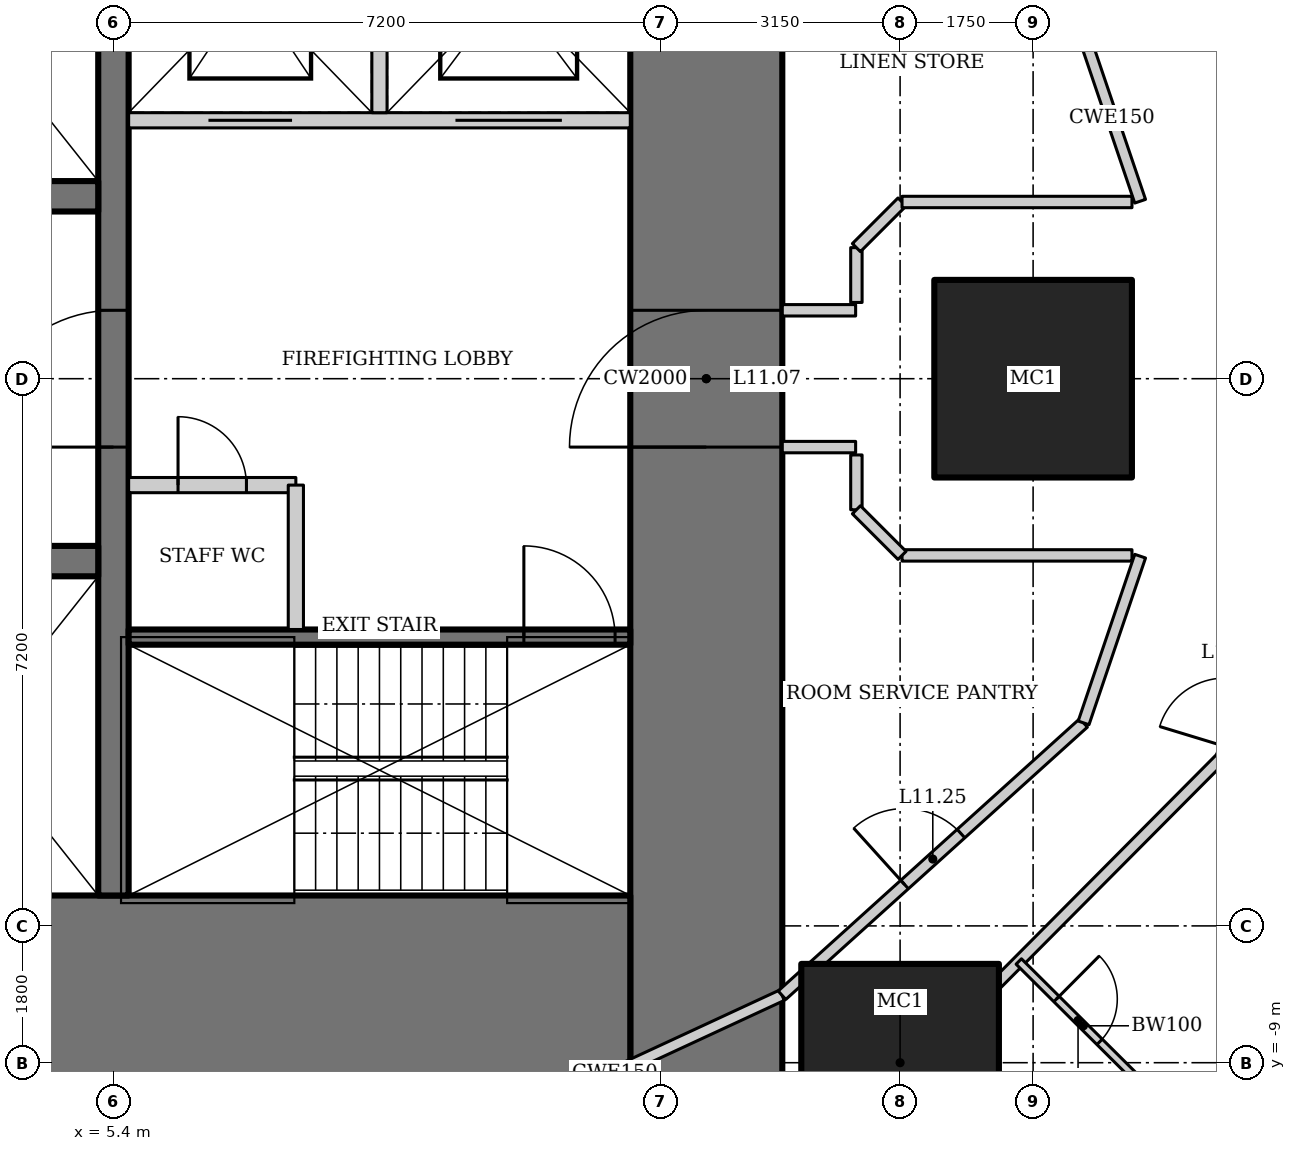
"""IFC4 building model, lengths in metres.
Left out: names, types, materials, properties, quantities, classifications, styles, units other than length and angle.
Written with IfcOpenShell. Run it as: python <this file> out.ifc"""

import sys

from ifc_helpers import new_model, si_unit, direction, frame, frame_2d, origin, origin_2d, place, context, subcontext, project, spatial, rectangle, hollow_rectangle, extrude, element, fill, save


model = new_model("IFC4")
c1 = context("Model", 3, precision=1e-05, world=origin(), true_north=direction((0.0, 1.0)))
c2 = subcontext(c1, "Body", "Model", "MODEL_VIEW")
j1 = project(units=[si_unit("LENGTHUNIT", "METRE"), si_unit("PLANEANGLEUNIT", "RADIAN")], contexts=[c1])
p1 = place(None, origin())
s1 = spatial("IfcSite", under=j1, at=p1, CompositionType="ELEMENT")
p2 = place(p1, origin())
s2 = spatial("IfcBuilding", under=s1, at=p2, CompositionType="ELEMENT")
p3 = place(p2, frame((0.0, 0.0, 55.0)))
s3 = spatial("IfcBuildingStorey", under=s2, at=p3, CompositionType="ELEMENT", Elevation=55.0)
for number, where, z_axis, x_axis in (
    (1, (17.5, 0.0, 0.0), (0.0, 0.0, 1.0), (1.0, 0.0, 0.0)),
    (2, (15.75, -9.0, 0.0), (0.0, 0.0, 1.0), (1.0, 0.0, 0.0)),
):
    element("IfcColumn", number, at=place(p3, frame(where, z_axis=z_axis, x_axis=x_axis)), inside=s3, PredefinedType="COLUMN", context=c2, shape_type="SweptSolid", body=[
        extrude(hollow_rectangle(XDim=2.6, YDim=2.6, WallThickness=0.13, at=origin_2d()), origin(), (0.0, 0.0, 1.0), 3.6),
    ])
p4 = place(p3, frame((13.2, -13.0, 0.0), z_axis=(0.0, 0.0, 1.0), x_axis=(0.0, 1.0, 0.0)))
e3 = element("IfcWall", 3, at=p4, inside=s3, PredefinedType="SHEAR", context=c2, shape_type="SweptSolid", body=[
    extrude(rectangle(XDim=26.0, YDim=2.0, at=frame_2d((13.0, 0.0))), origin(), (0.0, 0.0, 1.0), 3.6),
])
p5 = place(p4, frame((12.1, 0.0, 0.0)))
e4 = element("IfcOpeningElement", 4, at=p5, cuts=e3, PredefinedType="OPENING", context=c2, shape_type="SweptSolid", body=[
    extrude(rectangle(XDim=1.8, YDim=2.1, at=frame_2d((0.9, 1.05))), frame((0.0, 1.01, 0.0), z_axis=(0.0, -1.0, 0.0), x_axis=(1.0, 0.0, 0.0)), (0.0, 0.0, 1.0), 2.02),
])
p6 = place(p3, frame((-12.2, -8.0, 0.0), z_axis=(0.0, 0.0, 1.0), x_axis=(1.0, 0.0, 0.0)))
e5 = element("IfcWall", 5, at=p6, inside=s3, PredefinedType="SHEAR", context=c2, shape_type="SweptSolid", body=[
    extrude(rectangle(XDim=24.4, YDim=2.4, at=frame_2d((12.2, 0.0))), origin(), (0.0, 0.0, 1.0), 3.6),
])
p7 = place(p3, frame((5.4, -6.8, 0.0), z_axis=(0.0, 0.0, 1.0), x_axis=(0.0, 1.0, 0.0)))
e6 = element("IfcWall", 6, at=p7, inside=s3, PredefinedType="SHEAR", context=c2, shape_type="SweptSolid", body=[
    extrude(rectangle(XDim=13.6, YDim=0.4, at=frame_2d((6.8, 0.0))), origin(), (0.0, 0.0, 1.0), 3.6),
])
p8 = place(p7, frame((5.9, 0.0, 0.0)))
e7 = element("IfcOpeningElement", 7, at=p8, cuts=e6, PredefinedType="OPENING", context=c2, shape_type="SweptSolid", body=[
    extrude(rectangle(XDim=1.8, YDim=2.1, at=frame_2d((0.9, 1.05))), frame((0.0, 0.21, 0.0), z_axis=(0.0, -1.0, 0.0), x_axis=(1.0, 0.0, 0.0)), (0.0, 0.0, 1.0), 0.42),
])
p9 = place(p3, frame((-5.2, -2.4, 0.0), z_axis=(0.0, 0.0, 1.0), x_axis=(1.0, 0.0, 0.0)))
e8 = element("IfcWall", 8, at=p9, inside=s3, PredefinedType="SHEAR", context=c2, shape_type="SweptSolid", body=[
    extrude(rectangle(XDim=10.4, YDim=0.4, at=frame_2d((5.2, 0.0))), origin(), (0.0, 0.0, 1.0), 3.6),
])
p10 = place(p9, frame((0.55, 0.0, 0.0)))
e9 = element("IfcOpeningElement", 9, at=p10, cuts=e8, PredefinedType="OPENING", context=c2, shape_type="SweptSolid", body=[
    extrude(rectangle(XDim=1.1, YDim=2.2, at=frame_2d((0.55, 1.1))), frame((0.0, 0.21, 0.0), z_axis=(0.0, -1.0, 0.0), x_axis=(1.0, 0.0, 0.0)), (0.0, 0.0, 1.0), 0.42),
])
p11 = place(p9, frame((4.083, 0.0, 0.0)))
e10 = element("IfcOpeningElement", 10, at=p11, cuts=e8, PredefinedType="OPENING", context=c2, shape_type="SweptSolid", body=[
    extrude(rectangle(XDim=1.1, YDim=2.2, at=frame_2d((0.55, 1.1))), frame((0.0, 0.21, 0.0), z_axis=(0.0, -1.0, 0.0), x_axis=(1.0, 0.0, 0.0)), (0.0, 0.0, 1.0), 0.42),
])
p12 = place(p9, frame((7.617, 0.0, 0.0)))
e11 = element("IfcOpeningElement", 11, at=p12, cuts=e8, PredefinedType="OPENING", context=c2, shape_type="SweptSolid", body=[
    extrude(rectangle(XDim=1.1, YDim=2.2, at=frame_2d((0.55, 1.1))), frame((0.0, 0.21, 0.0), z_axis=(0.0, -1.0, 0.0), x_axis=(1.0, 0.0, 0.0)), (0.0, 0.0, 1.0), 0.42),
])
p13 = place(p3, frame((5.2, 2.4, 0.0), z_axis=(0.0, 0.0, 1.0), x_axis=(-1.0, 0.0, 0.0)))
e12 = element("IfcWall", 12, at=p13, inside=s3, PredefinedType="SHEAR", context=c2, shape_type="SweptSolid", body=[
    extrude(rectangle(XDim=10.4, YDim=0.4, at=frame_2d((5.2, 0.0))), origin(), (0.0, 0.0, 1.0), 3.6),
])
p14 = place(p3, frame((5.6, -3.4, 0.0), z_axis=(0.0, 0.0, 1.0), x_axis=(1.0, 0.0, 0.0)))
e13 = element("IfcWall", 13, at=p14, inside=s3, PredefinedType="SHEAR", context=c2, shape_type="SweptSolid", body=[
    extrude(rectangle(XDim=6.6, YDim=0.2, at=frame_2d((3.3, 0.0))), origin(), (0.0, 0.0, 1.0), 3.6),
])
p15 = place(p14, frame((5.2, 0.0, 0.0)))
e14 = element("IfcOpeningElement", 14, at=p15, cuts=e13, PredefinedType="OPENING", context=c2, shape_type="SweptSolid", body=[
    extrude(rectangle(XDim=1.2, YDim=2.1, at=frame_2d((0.6, 1.05))), frame((0.0, 0.11, 0.0), z_axis=(0.0, -1.0, 0.0), x_axis=(1.0, 0.0, 0.0)), (0.0, 0.0, 1.0), 0.22),
])
p16 = place(p3, frame((12.2, 3.4, 0.0), z_axis=(0.0, 0.0, 1.0), x_axis=(-1.0, 0.0, 0.0)))
e15 = element("IfcWall", 15, at=p16, inside=s3, PredefinedType="SOLIDWALL", context=c2, shape_type="SweptSolid", body=[
    extrude(rectangle(XDim=6.6, YDim=0.2, at=frame_2d((3.3, 0.0))), origin(), (0.0, 0.0, 1.0), 3.6),
])
p17 = place(p16, frame((4.45, 0.0, 0.0)))
e16 = element("IfcOpeningElement", 16, at=p17, cuts=e15, PredefinedType="OPENING", context=c2, shape_type="SweptSolid", body=[
    extrude(rectangle(XDim=1.1, YDim=2.2, at=frame_2d((0.55, 1.1))), frame((0.0, 0.11, 0.0), z_axis=(0.0, -1.0, 0.0), x_axis=(1.0, 0.0, 0.0)), (0.0, 0.0, 1.0), 0.22),
])
p18 = place(p16, frame((0.9, 0.0, 0.0)))
e17 = element("IfcOpeningElement", 17, at=p18, cuts=e15, PredefinedType="OPENING", context=c2, shape_type="SweptSolid", body=[
    extrude(rectangle(XDim=1.4, YDim=2.2, at=frame_2d((0.7, 1.1))), frame((0.0, 0.11, 0.0), z_axis=(0.0, -1.0, 0.0), x_axis=(1.0, 0.0, 0.0)), (0.0, 0.0, 1.0), 0.22),
])
p19 = place(p3, frame((8.9, 3.5, 0.0), z_axis=(0.0, 0.0, 1.0), x_axis=(0.0, 1.0, 0.0)))
e18 = element("IfcWall", 18, at=p19, inside=s3, PredefinedType="SOLIDWALL", context=c2, shape_type="SweptSolid", body=[
    extrude(rectangle(XDim=3.3, YDim=0.2, at=frame_2d((1.65, 0.0))), origin(), (0.0, 0.0, 1.0), 3.6),
])
p20 = place(p3, frame((5.6, -1.4, 0.0), z_axis=(0.0, 0.0, 1.0), x_axis=(1.0, 0.0, 0.0)))
e19 = element("IfcWall", 19, at=p20, inside=s3, PredefinedType="SOLIDWALL", context=c2, shape_type="SweptSolid", body=[
    extrude(rectangle(XDim=2.2, YDim=0.2, at=frame_2d((1.1, 0.0))), origin(), (0.0, 0.0, 1.0), 3.45),
])
p21 = place(p20, frame((0.65, 0.0, 0.0)))
e20 = element("IfcOpeningElement", 20, at=p21, cuts=e19, PredefinedType="OPENING", context=c2, shape_type="SweptSolid", body=[
    extrude(rectangle(XDim=0.9, YDim=2.1, at=frame_2d((0.45, 1.05))), frame((0.0, 0.11, 0.0), z_axis=(0.0, -1.0, 0.0), x_axis=(1.0, 0.0, 0.0)), (0.0, 0.0, 1.0), 0.22),
])
p22 = place(p3, frame((7.8, -1.4, 0.0), z_axis=(0.0, 0.0, 1.0), x_axis=(0.0, -1.0, 0.0)))
e21 = element("IfcWall", 21, at=p22, inside=s3, PredefinedType="SOLIDWALL", context=c2, shape_type="SweptSolid", body=[
    extrude(rectangle(XDim=1.9, YDim=0.2, at=frame_2d((0.95, 0.0))), origin(), (0.0, 0.0, 1.0), 3.45),
])
p23 = place(p3, frame((24.435, -13.909, 0.0), z_axis=(0.0, 0.0, 1.0), x_axis=(-0.870612006791, 0.491970256856, 0.0)))
e22 = element("IfcWall", 22, at=p23, inside=s3, PredefinedType="PARTITIONING", context=c2, shape_type="SweptSolid", body=[
    extrude(rectangle(XDim=9.802, YDim=0.15, at=frame_2d((4.901, 0.0))), origin(), (0.0, 0.0, 1.0), 2.693),
])
p24 = place(p3, frame((21.5, 0.0, 0.0), z_axis=(0.0, 0.0, 1.0), x_axis=(-0.291383581394, 0.95660629754, 0.0)))
e23 = element("IfcWall", 23, at=p24, inside=s3, PredefinedType="PARTITIONING", context=c2, shape_type="SweptSolid", body=[
    extrude(rectangle(XDim=5.208, YDim=0.15, at=frame_2d((2.604, 0.0))), origin(), (0.0, 0.0, 1.0), 3.45),
])
p25 = place(p3, frame((11.147, -11.544, 0.0), z_axis=(0.0, 0.0, 1.0), x_axis=(0.888333171507, 0.459199495209, 0.0)))
e24 = element("IfcWall", 24, at=p25, inside=s3, PredefinedType="PARTITIONING", context=c2, shape_type="SweptSolid", body=[
    extrude(rectangle(XDim=5.351, YDim=0.15, at=frame_2d((2.676, 0.0))), origin(), (0.0, 0.0, 1.0), 3.45),
])
p26 = place(p25, frame((0.15, 0.0, 0.0)))
e25 = element("IfcOpeningElement", 25, at=p26, cuts=e24, PredefinedType="OPENING", context=c2, shape_type="SweptSolid", body=[
    extrude(rectangle(XDim=0.9, YDim=2.1, at=frame_2d((0.45, 1.05))), frame((0.0, 0.085, 0.0), z_axis=(0.0, -1.0, 0.0), x_axis=(1.0, 0.0, 0.0)), (0.0, 0.0, 1.0), 0.17),
])
p27 = place(p3, frame((15.901, -9.086, 0.0), z_axis=(0.0, 0.0, 1.0), x_axis=(0.705121546414, 0.709086457904, 0.0)))
e26 = element("IfcWall", 26, at=p27, inside=s3, PredefinedType="PARTITIONING", context=c2, shape_type="SweptSolid", body=[
    extrude(rectangle(XDim=5.788, YDim=0.15, at=frame_2d((2.894, 0.0))), origin(), (0.0, 0.0, 1.0), 3.45),
])
p28 = place(p3, frame((19.982, -4.982, 0.0), z_axis=(0.0, 0.0, 1.0), x_axis=(0.291383581394, 0.95660629754, 0.0)))
e27 = element("IfcWall", 27, at=p28, inside=s3, PredefinedType="PARTITIONING", context=c2, shape_type="SweptSolid", body=[
    extrude(rectangle(XDim=5.208, YDim=0.15, at=frame_2d((2.604, 0.0))), origin(), (0.0, 0.0, 1.0), 3.45),
])
p29 = place(p28, frame((0.15, 0.0, 0.0)))
e28 = element("IfcOpeningElement", 28, at=p29, cuts=e27, PredefinedType="OPENING", context=c2, shape_type="SweptSolid", body=[
    extrude(rectangle(XDim=0.9, YDim=2.1, at=frame_2d((0.45, 1.05))), frame((0.0, 0.085, 0.0), z_axis=(0.0, -1.0, 0.0), x_axis=(1.0, 0.0, 0.0)), (0.0, 0.0, 1.0), 0.17),
])
p30 = place(p3, frame((9.801, -10.149, 0.0), z_axis=(0.0, 0.0, 1.0), x_axis=(0.907279653965, 0.420527798727, 0.0)))
e29 = element("IfcWall", 29, at=p30, inside=s3, PredefinedType="PARTITIONING", context=c2, shape_type="SweptSolid", body=[
    extrude(rectangle(XDim=4.844, YDim=0.15, at=frame_2d((2.422, 0.0))), origin(), (0.0, 0.0, 1.0), 3.45),
])
p31 = place(p3, frame((14.196, -8.112, 0.0), z_axis=(0.0, 0.0, 1.0), x_axis=(0.742194222, 0.670184852731, 0.0)))
e30 = element("IfcWall", 30, at=p31, inside=s3, PredefinedType="PARTITIONING", context=c2, shape_type="SweptSolid", body=[
    extrude(rectangle(XDim=5.347, YDim=0.15, at=frame_2d((2.673, 0.0))), origin(), (0.0, 0.0, 1.0), 3.45),
])
p32 = place(p31, frame((2.173, 0.0, 0.0)))
e31 = element("IfcOpeningElement", 31, at=p32, cuts=e30, PredefinedType="OPENING", context=c2, shape_type="SweptSolid", body=[
    extrude(rectangle(XDim=1.0, YDim=2.1, at=frame_2d((0.5, 1.05))), frame((0.0, 0.085, 0.0), z_axis=(0.0, -1.0, 0.0), x_axis=(1.0, 0.0, 0.0)), (0.0, 0.0, 1.0), 0.17),
])
p33 = place(p3, frame((17.311, -7.668, 0.0), z_axis=(0.0, 0.0, 1.0), x_axis=(0.709138392716, -0.705069315724, 0.0)))
e32 = element("IfcWall", 32, at=p33, inside=s3, PredefinedType="PARTITIONING", context=c2, shape_type="SweptSolid", body=[
    extrude(rectangle(XDim=2.4, YDim=0.1, at=frame_2d((1.2, 0.0))), origin(), (0.0, 0.0, 1.0), 3.45),
])
p34 = place(p33, frame((0.7, 0.0, 0.0)))
e33 = element("IfcOpeningElement", 33, at=p34, cuts=e32, PredefinedType="OPENING", context=c2, shape_type="SweptSolid", body=[
    extrude(rectangle(XDim=0.8, YDim=2.1, at=frame_2d((0.4, 1.05))), frame((0.0, 0.06, 0.0), z_axis=(0.0, -1.0, 0.0), x_axis=(1.0, 0.0, 0.0)), (0.0, 0.0, 1.0), 0.12),
])
for number, where, z_axis, x_axis in (
    (34, (18.908, 2.335, 0.0), (0.0, 0.0, 1.0), (-0.321, 0.947, 0.0)),
    (35, (18.164, -4.529, 0.0), (0.0, 0.0, 1.0), (0.321, 0.947, 0.0)),
):
    element("IfcWall", number, at=place(p3, frame(where, z_axis=z_axis, x_axis=x_axis)), inside=s3, PredefinedType="PARTITIONING", context=c2, shape_type="SweptSolid", body=[
        extrude(rectangle(XDim=2.317, YDim=0.15, at=frame_2d((1.158, 0.0))), origin(), (0.0, 0.0, 1.0), 3.45),
    ])
for number, where, z_axis, x_axis in (
    (36, (14.2, -0.9, 0.0), (0.0, 0.0, 1.0), (1.0, 0.0, 0.0)),
    (37, (14.2, 0.9, 0.0), (0.0, 0.0, 1.0), (1.0, 0.0, 0.0)),
):
    element("IfcWall", number, at=place(p3, frame(where, z_axis=z_axis, x_axis=x_axis)), inside=s3, PredefinedType="PARTITIONING", context=c2, shape_type="SweptSolid", body=[
        extrude(rectangle(XDim=0.965, YDim=0.15, at=frame_2d((0.482, 0.0))), origin(), (0.0, 0.0, 1.0), 3.45),
    ])
p35 = place(p3, frame((15.175, 1.003, 0.0), z_axis=(0.0, 0.0, 1.0), x_axis=(0.0, 1.0, 0.0)))
e38 = element("IfcWall", 38, at=p35, inside=s3, PredefinedType="PARTITIONING", context=c2, shape_type="SweptSolid", body=[
    extrude(rectangle(XDim=0.721, YDim=0.15, at=frame_2d((0.361, 0.0))), origin(), (0.0, 0.0, 1.0), 3.45),
])
p36 = place(p3, frame((15.175, 1.725, 0.0), z_axis=(0.0, 0.0, 1.0), x_axis=(0.707106781187, 0.707106781187, 0.0)))
e39 = element("IfcWall", 39, at=p36, inside=s3, PredefinedType="PARTITIONING", context=c2, shape_type="SweptSolid", body=[
    extrude(rectangle(XDim=0.849, YDim=0.15, at=frame_2d((0.425, 0.0))), origin(), (0.0, 0.0, 1.0), 3.45),
])
p37 = place(p3, frame((15.775, 2.325, 0.0), z_axis=(0.0, 0.0, 1.0), x_axis=(1.0, 0.0, 0.0)))
e40 = element("IfcWall", 40, at=p37, inside=s3, PredefinedType="PARTITIONING", context=c2, shape_type="SweptSolid", body=[
    extrude(rectangle(XDim=3.025, YDim=0.15, at=frame_2d((1.513, 0.0))), origin(), (0.0, 0.0, 1.0), 3.45),
])
p38 = place(p3, frame((15.175, -1.725, 0.0), z_axis=(0.0, 0.0, 1.0), x_axis=(0.0, 1.0, 0.0)))
e41 = element("IfcWall", 41, at=p38, inside=s3, PredefinedType="PARTITIONING", context=c2, shape_type="SweptSolid", body=[
    extrude(rectangle(XDim=0.721, YDim=0.15, at=frame_2d((0.361, 0.0))), origin(), (0.0, 0.0, 1.0), 3.45),
])
p39 = place(p3, frame((18.801, -2.325, 0.0), z_axis=(0.0, 0.0, 1.0), x_axis=(-1.0, 0.0, 0.0)))
e42 = element("IfcWall", 42, at=p39, inside=s3, PredefinedType="PARTITIONING", context=c2, shape_type="SweptSolid", body=[
    extrude(rectangle(XDim=3.025, YDim=0.15, at=frame_2d((1.513, 0.0))), origin(), (0.0, 0.0, 1.0), 3.45),
])
p40 = place(p3, frame((15.775, -2.325, 0.0), z_axis=(0.0, 0.0, 1.0), x_axis=(-0.707106781187, 0.707106781187, 0.0)))
e43 = element("IfcWall", 43, at=p40, inside=s3, PredefinedType="PARTITIONING", context=c2, shape_type="SweptSolid", body=[
    extrude(rectangle(XDim=0.849, YDim=0.15, at=frame_2d((0.425, 0.0))), origin(), (0.0, 0.0, 1.0), 3.45),
])
p41 = place(p21, origin())
e44 = element("IfcDoor", 44, at=p41, inside=s3, OperationType="SINGLE_SWING_LEFT", PredefinedType="DOOR", context=c2, shape_type="SweptSolid", body=[
    extrude(rectangle(XDim=0.9, YDim=2.1, at=frame_2d((0.45, 1.05))), frame((0.0, 0.025, 0.0), z_axis=(0.0, -1.0, 0.0), x_axis=(1.0, 0.0, 0.0)), (0.0, 0.0, 1.0), 0.05),
])
fill(e20, e44)
p42 = place(p8, origin())
e45 = element("IfcDoor", 45, at=p42, inside=s3, OperationType="DOUBLE_DOOR_DOUBLE_SWING", PredefinedType="DOOR", context=c2, shape_type="SweptSolid", body=[
    extrude(rectangle(XDim=1.8, YDim=2.1, at=frame_2d((0.9, 1.05))), frame((0.0, 0.025, 0.0), z_axis=(0.0, -1.0, 0.0), x_axis=(1.0, 0.0, 0.0)), (0.0, 0.0, 1.0), 0.05),
])
fill(e7, e45)
p43 = place(p15, origin())
e46 = element("IfcDoor", 46, at=p43, inside=s3, OperationType="SINGLE_SWING_RIGHT", PredefinedType="DOOR", context=c2, shape_type="SweptSolid", body=[
    extrude(rectangle(XDim=1.2, YDim=2.1, at=frame_2d((0.6, 1.05))), frame((0.0, 0.025, 0.0), z_axis=(0.0, -1.0, 0.0), x_axis=(1.0, 0.0, 0.0)), (0.0, 0.0, 1.0), 0.05),
])
fill(e14, e46)
p44 = place(p5, origin())
e47 = element("IfcDoor", 47, at=p44, inside=s3, OperationType="DOUBLE_DOOR_DOUBLE_SWING", PredefinedType="DOOR", context=c2, shape_type="SweptSolid", body=[
    extrude(rectangle(XDim=1.8, YDim=2.1, at=frame_2d((0.9, 1.05))), frame((0.0, 0.025, 0.0), z_axis=(0.0, -1.0, 0.0), x_axis=(1.0, 0.0, 0.0)), (0.0, 0.0, 1.0), 0.05),
])
fill(e4, e47)
p45 = place(p17, origin())
e48 = element("IfcDoor", 48, at=p45, inside=s3, OperationType="DOUBLE_DOOR_SLIDING", PredefinedType="DOOR", context=c2, shape_type="SweptSolid", body=[
    extrude(rectangle(XDim=1.1, YDim=2.2, at=frame_2d((0.55, 1.1))), frame((0.0, 0.025, 0.0), z_axis=(0.0, -1.0, 0.0), x_axis=(1.0, 0.0, 0.0)), (0.0, 0.0, 1.0), 0.05),
])
fill(e16, e48)
p46 = place(p18, origin())
e49 = element("IfcDoor", 49, at=p46, inside=s3, OperationType="DOUBLE_DOOR_SLIDING", PredefinedType="DOOR", context=c2, shape_type="SweptSolid", body=[
    extrude(rectangle(XDim=1.4, YDim=2.2, at=frame_2d((0.7, 1.1))), frame((0.0, 0.025, 0.0), z_axis=(0.0, -1.0, 0.0), x_axis=(1.0, 0.0, 0.0)), (0.0, 0.0, 1.0), 0.05),
])
fill(e17, e49)
p47 = place(p32, origin())
e50 = element("IfcDoor", 50, at=p47, inside=s3, OperationType="SINGLE_SWING_LEFT", PredefinedType="DOOR", context=c2, shape_type="SweptSolid", body=[
    extrude(rectangle(XDim=1.0, YDim=2.1, at=frame_2d((0.5, 1.05))), frame((0.0, 0.025, 0.0), z_axis=(0.0, -1.0, 0.0), x_axis=(1.0, 0.0, 0.0)), (0.0, 0.0, 1.0), 0.05),
])
fill(e31, e50)
p48 = place(p34, origin())
e51 = element("IfcDoor", 51, at=p48, inside=s3, OperationType="SINGLE_SWING_LEFT", PredefinedType="DOOR", context=c2, shape_type="SweptSolid", body=[
    extrude(rectangle(XDim=0.8, YDim=2.1, at=frame_2d((0.4, 1.05))), frame((0.0, 0.025, 0.0), z_axis=(0.0, -1.0, 0.0), x_axis=(1.0, 0.0, 0.0)), (0.0, 0.0, 1.0), 0.05),
])
fill(e33, e51)
save(model, sys.argv[1])
